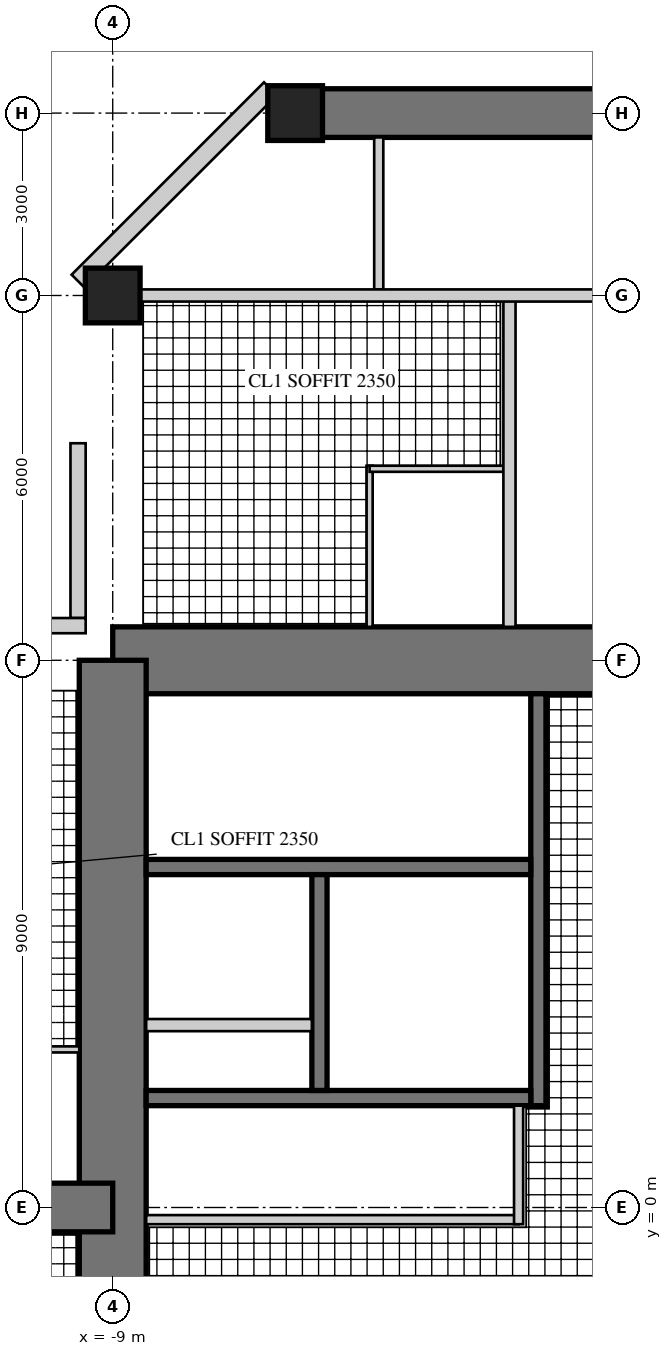
"""IFC4 building model, lengths in metres.
Left out: names, types, materials, properties, quantities, classifications, styles, units other than length and angle.
Written with IfcOpenShell. Run it as: python <this file> out.ifc"""

import sys

from ifc_helpers import new_model, si_unit, direction, frame, frame_2d, origin, origin_2d, place, context, subcontext, project, spatial, rectangle, hollow_rectangle, extrude, element, fill, save


model = new_model("IFC4")
c1 = context("Model", 3, precision=1e-05, world=origin(), true_north=direction((0.0, 1.0)))
c2 = subcontext(c1, "Body", "Model", "MODEL_VIEW")
j1 = project(units=[si_unit("LENGTHUNIT", "METRE"), si_unit("PLANEANGLEUNIT", "RADIAN")], contexts=[c1])
p1 = place(None, origin())
s1 = spatial("IfcSite", under=j1, at=p1, CompositionType="ELEMENT")
p2 = place(p1, origin())
s2 = spatial("IfcBuilding", under=s1, at=p2, CompositionType="ELEMENT")
p3 = place(p2, frame((0.0, 0.0, 200.1)))
s3 = spatial("IfcBuildingStorey", under=s2, at=p3, CompositionType="ELEMENT", Elevation=200.1)
p4 = place(p3, frame((9.0, 9.0, 0.0), z_axis=(0.0, 0.0, 1.0), x_axis=(-1.0, 0.0, 0.0)))
e1 = element("IfcWall", 1, at=p4, inside=s3, PredefinedType="SHEAR", context=c2, shape_type="SweptSolid", body=[
    extrude(rectangle(XDim=18.0, YDim=1.1, at=frame_2d((9.0, 0.0))), origin(), (0.0, 0.0, 1.0), 3.4),
])
p5 = place(p4, frame((9.8, 0.0, 0.0)))
e2 = element("IfcOpeningElement", 2, at=p5, cuts=e1, PredefinedType="OPENING", context=c2, shape_type="SweptSolid", body=[
    extrude(rectangle(XDim=1.0, YDim=2.4, at=frame_2d((0.5, 1.2))), frame((0.0, 0.56, 0.0), z_axis=(0.0, -1.0, 0.0), x_axis=(1.0, 0.0, 0.0)), (0.0, 0.0, 1.0), 1.12),
])
p6 = place(p3, frame((-9.0, 9.0, 0.0), z_axis=(0.0, 0.0, 1.0), x_axis=(0.0, -1.0, 0.0)))
e3 = element("IfcWall", 3, at=p6, inside=s3, PredefinedType="SHEAR", context=c2, shape_type="SweptSolid", body=[
    extrude(rectangle(XDim=18.0, YDim=1.1, at=frame_2d((9.0, 0.0))), origin(), (0.0, 0.0, 1.0), 3.4),
])
p7 = place(p6, frame((9.8, 0.0, 0.0)))
e4 = element("IfcOpeningElement", 4, at=p7, cuts=e3, PredefinedType="OPENING", context=c2, shape_type="SweptSolid", body=[
    extrude(rectangle(XDim=1.0, YDim=2.4, at=frame_2d((0.5, 1.2))), frame((0.0, 0.56, 0.0), z_axis=(0.0, -1.0, 0.0), x_axis=(1.0, 0.0, 0.0)), (0.0, 0.0, 1.0), 1.12),
])
p8 = place(p3, frame((-2.0, 1.675, 0.0), z_axis=(0.0, 0.0, 1.0), x_axis=(0.0, 1.0, 0.0)))
e5 = element("IfcWall", 5, at=p8, inside=s3, PredefinedType="SHEAR", context=c2, shape_type="SweptSolid", body=[
    extrude(rectangle(XDim=6.775, YDim=0.25, at=frame_2d((3.387, 0.0))), origin(), (0.0, 0.0, 1.0), 3.4),
])
p9 = place(p8, frame((0.725, 0.0, 0.0)))
e6 = element("IfcOpeningElement", 6, at=p9, cuts=e5, PredefinedType="OPENING", context=c2, shape_type="SweptSolid", body=[
    extrude(rectangle(XDim=1.0, YDim=2.1, at=frame_2d((0.5, 1.05))), frame((0.0, 0.135, 0.0), z_axis=(0.0, -1.0, 0.0), x_axis=(1.0, 0.0, 0.0)), (0.0, 0.0, 1.0), 0.27),
])
p10 = place(p3, frame((-2.125, 1.8, 0.0), z_axis=(0.0, 0.0, 1.0), x_axis=(-1.0, 0.0, 0.0)))
e7 = element("IfcWall", 7, at=p10, inside=s3, PredefinedType="SHEAR", context=c2, shape_type="SweptSolid", body=[
    extrude(rectangle(XDim=6.325, YDim=0.25, at=frame_2d((3.163, 0.0))), origin(), (0.0, 0.0, 1.0), 3.4),
])
p11 = place(p3, frame((-2.125, 5.6, 0.0), z_axis=(0.0, 0.0, 1.0), x_axis=(-1.0, 0.0, 0.0)))
e8 = element("IfcWall", 8, at=p11, inside=s3, PredefinedType="SHEAR", context=c2, shape_type="SweptSolid", body=[
    extrude(rectangle(XDim=6.325, YDim=0.25, at=frame_2d((3.163, 0.0))), origin(), (0.0, 0.0, 1.0), 3.4),
])
p12 = place(p11, frame((0.175, 0.0, 0.0)))
e9 = element("IfcOpeningElement", 9, at=p12, cuts=e8, PredefinedType="OPENING", context=c2, shape_type="SweptSolid", body=[
    extrude(rectangle(XDim=1.0, YDim=2.1, at=frame_2d((0.5, 1.05))), frame((0.0, 0.135, 0.0), z_axis=(0.0, -1.0, 0.0), x_axis=(1.0, 0.0, 0.0)), (0.0, 0.0, 1.0), 0.27),
])
p13 = place(p3, frame((-5.6, 1.925, 0.0), z_axis=(0.0, 0.0, 1.0), x_axis=(0.0, 1.0, 0.0)))
e10 = element("IfcWall", 10, at=p13, inside=s3, PredefinedType="SHEAR", context=c2, shape_type="SweptSolid", body=[
    extrude(rectangle(XDim=3.55, YDim=0.25, at=frame_2d((1.775, 0.0))), origin(), (0.0, 0.0, 1.0), 3.4),
])
p14 = place(p13, frame((1.525, 0.0, 0.0)))
e11 = element("IfcOpeningElement", 11, at=p14, cuts=e10, PredefinedType="OPENING", context=c2, shape_type="SweptSolid", body=[
    extrude(rectangle(XDim=1.1, YDim=2.2, at=frame_2d((0.55, 1.1))), frame((0.0, 0.135, 0.0), z_axis=(0.0, -1.0, 0.0), x_axis=(1.0, 0.0, 0.0)), (0.0, 0.0, 1.0), 0.27),
])
p15 = place(p13, frame((0.075, 0.0, 0.0)))
e12 = element("IfcOpeningElement", 12, at=p15, cuts=e10, PredefinedType="OPENING", context=c2, shape_type="SweptSolid", body=[
    extrude(rectangle(XDim=0.8, YDim=2.1, at=frame_2d((0.4, 1.05))), frame((0.0, 0.135, 0.0), z_axis=(0.0, -1.0, 0.0), x_axis=(1.0, 0.0, 0.0)), (0.0, 0.0, 1.0), 0.27),
])
p16 = place(p3, frame((-5.725, 3.0, 0.0), z_axis=(0.0, 0.0, 1.0), x_axis=(-1.0, 0.0, 0.0)))
e13 = element("IfcWall", 13, at=p16, inside=s3, PredefinedType="PARTITIONING", context=c2, shape_type="SweptSolid", body=[
    extrude(rectangle(XDim=2.725, YDim=0.2, at=frame_2d((1.362, 0.0))), origin(), (0.0, 0.0, 1.0), 3.4),
])
p17 = place(p3, frame((6.0, 18.0, 0.0), z_axis=(0.0, 0.0, 1.0), x_axis=(-1.0, 0.0, 0.0)))
e14 = element("IfcWall", 14, at=p17, inside=s3, PredefinedType="SHEAR", context=c2, shape_type="SweptSolid", body=[
    extrude(rectangle(XDim=12.0, YDim=0.8, at=frame_2d((6.0, 0.0))), origin(), (0.0, 0.0, 1.0), 3.4),
])
p18 = place(p17, frame((1.625, 0.0, 0.6)))
e15 = element("IfcOpeningElement", 15, at=p18, cuts=e14, PredefinedType="OPENING", context=c2, shape_type="SweptSolid", body=[
    extrude(rectangle(XDim=3.0, YDim=2.4, at=frame_2d((1.5, 1.2))), frame((0.0, 0.41, 0.0), z_axis=(0.0, -1.0, 0.0), x_axis=(1.0, 0.0, 0.0)), (0.0, 0.0, 1.0), 0.82),
])
p19 = place(p17, frame((7.375, 0.0, 0.6)))
e16 = element("IfcOpeningElement", 16, at=p19, cuts=e14, PredefinedType="OPENING", context=c2, shape_type="SweptSolid", body=[
    extrude(rectangle(XDim=3.0, YDim=2.4, at=frame_2d((1.5, 1.2))), frame((0.0, 0.41, 0.0), z_axis=(0.0, -1.0, 0.0), x_axis=(1.0, 0.0, 0.0)), (0.0, 0.0, 1.0), 0.82),
])
p20 = place(p3, frame((-9.0, 0.0, 0.0), z_axis=(0.0, 0.0, 1.0), x_axis=(-1.0, 0.0, 0.0)))
e17 = element("IfcWall", 17, at=p20, inside=s3, PredefinedType="SHEAR", context=c2, shape_type="SweptSolid", body=[
    extrude(rectangle(XDim=18.0, YDim=0.8, at=frame_2d((9.0, 0.0))), origin(), (0.0, 0.0, 1.0), 3.4),
])
p21 = place(p20, frame((3.95, 0.0, 0.0)))
e18 = element("IfcOpeningElement", 18, at=p21, cuts=e17, PredefinedType="OPENING", context=c2, shape_type="SweptSolid", body=[
    extrude(rectangle(XDim=1.0, YDim=2.15, at=frame_2d((0.5, 1.075))), frame((0.0, 0.41, 0.0), z_axis=(0.0, -1.0, 0.0), x_axis=(1.0, 0.0, 0.0)), (0.0, 0.0, 1.0), 0.82),
])
p22 = place(p20, frame((6.6, 0.0, 0.0)))
e19 = element("IfcOpeningElement", 19, at=p22, cuts=e17, PredefinedType="OPENING", context=c2, shape_type="SweptSolid", body=[
    extrude(rectangle(XDim=1.0, YDim=2.15, at=frame_2d((0.5, 1.075))), frame((0.0, 0.41, 0.0), z_axis=(0.0, -1.0, 0.0), x_axis=(1.0, 0.0, 0.0)), (0.0, 0.0, 1.0), 0.82),
])
p23 = place(p20, frame((13.25, 0.0, 0.0)))
e20 = element("IfcOpeningElement", 20, at=p23, cuts=e17, PredefinedType="OPENING", context=c2, shape_type="SweptSolid", body=[
    extrude(rectangle(XDim=1.0, YDim=2.2, at=frame_2d((0.5, 1.1))), frame((0.0, 0.41, 0.0), z_axis=(0.0, -1.0, 0.0), x_axis=(1.0, 0.0, 0.0)), (0.0, 0.0, 1.0), 0.82),
])
for number, where, z_axis, x_axis in (
    (21, (-9.0, 15.0, 0.0), (0.0, 0.0, 1.0), (1.0, 0.0, 0.0)),
    (22, (-6.0, 18.0, 0.0), (0.0, 0.0, 1.0), (1.0, 0.0, 0.0)),
):
    element("IfcColumn", number, at=place(p3, frame(where, z_axis=z_axis, x_axis=x_axis)), inside=s3, PredefinedType="COLUMN", context=c2, shape_type="SweptSolid", body=[
        extrude(rectangle(XDim=0.9, YDim=0.9, at=origin_2d()), origin(), (0.0, 0.0, 1.0), 3.4),
    ])
p24 = place(p3, frame((-6.406, 18.4, 0.0), z_axis=(0.0, 0.0, 1.0), x_axis=(-0.707134062067, -0.707079499254, 0.0)))
e23 = element("IfcWall", 23, at=p24, inside=s3, PredefinedType="SOLIDWALL", context=c2, shape_type="SweptSolid", body=[
    extrude(rectangle(XDim=4.475, YDim=0.3, at=frame_2d((2.237, 0.0))), origin(), (0.0, 0.0, 1.0), 3.22),
])
p25 = place(p24, frame((1.787, 0.0, 0.3)))
e24 = element("IfcOpeningElement", 24, at=p25, cuts=e23, PredefinedType="OPENING", context=c2, shape_type="SweptSolid", body=[
    extrude(rectangle(XDim=0.9, YDim=2.4, at=frame_2d((0.45, 1.2))), frame((0.0, 0.16, 0.0), z_axis=(0.0, -1.0, 0.0), x_axis=(1.0, 0.0, 0.0)), (0.0, 0.0, 1.0), 0.32),
])
p26 = place(p3, frame((-9.57, 12.57, 0.0), z_axis=(0.0, 0.0, 1.0), x_axis=(0.0, -1.0, 0.0)))
e25 = element("IfcWall", 25, at=p26, inside=s3, PredefinedType="SOLIDWALL", context=c2, shape_type="SweptSolid", body=[
    extrude(rectangle(XDim=2.875, YDim=0.25, at=frame_2d((1.438, 0.0))), origin(), (0.0, 0.0, 1.0), 3.22),
])
p27 = place(p26, frame((0.6, 0.0, 0.0)))
e26 = element("IfcOpeningElement", 26, at=p27, cuts=e25, PredefinedType="OPENING", context=c2, shape_type="SweptSolid", body=[
    extrude(rectangle(XDim=1.0, YDim=2.2, at=frame_2d((0.5, 1.1))), frame((0.0, 0.135, 0.0), z_axis=(0.0, -1.0, 0.0), x_axis=(1.0, 0.0, 0.0)), (0.0, 0.0, 1.0), 0.27),
])
p28 = place(p3, frame((-9.445, 9.57, 0.0), z_axis=(0.0, 0.0, 1.0), x_axis=(-1.0, 0.0, 0.0)))
e27 = element("IfcWall", 27, at=p28, inside=s3, PredefinedType="SOLIDWALL", context=c2, shape_type="SweptSolid", body=[
    extrude(rectangle(XDim=3.125, YDim=0.25, at=frame_2d((1.562, 0.0))), origin(), (0.0, 0.0, 1.0), 3.22),
])
p29 = place(p28, frame((0.6, 0.0, 0.0)))
e28 = element("IfcOpeningElement", 28, at=p29, cuts=e27, PredefinedType="OPENING", context=c2, shape_type="SweptSolid", body=[
    extrude(rectangle(XDim=1.0, YDim=2.2, at=frame_2d((0.5, 1.1))), frame((0.0, 0.135, 0.0), z_axis=(0.0, -1.0, 0.0), x_axis=(1.0, 0.0, 0.0)), (0.0, 0.0, 1.0), 0.27),
])
p30 = place(p3, frame((-2.325, -0.2, 0.0), z_axis=(0.0, 0.0, 1.0), x_axis=(-1.0, 0.0, 0.0)))
e29 = element("IfcWall", 29, at=p30, inside=s3, PredefinedType="PARTITIONING", context=c2, shape_type="SweptSolid", body=[
    extrude(rectangle(XDim=6.125, YDim=0.15, at=frame_2d((3.062, 0.0))), origin(), (0.0, 0.0, 1.0), 3.22),
])
p31 = place(p30, frame((0.4, 0.0, 0.0)))
e30 = element("IfcOpeningElement", 30, at=p31, cuts=e29, PredefinedType="OPENING", context=c2, shape_type="SweptSolid", body=[
    extrude(rectangle(XDim=1.0, YDim=2.1, at=frame_2d((0.5, 1.05))), frame((0.0, 0.085, 0.0), z_axis=(0.0, -1.0, 0.0), x_axis=(1.0, 0.0, 0.0)), (0.0, 0.0, 1.0), 0.17),
])
p32 = place(p3, frame((-2.325, 1.675, 0.0), z_axis=(0.0, 0.0, 1.0), x_axis=(0.0, -1.0, 0.0)))
e31 = element("IfcWall", 31, at=p32, inside=s3, PredefinedType="PARTITIONING", context=c2, shape_type="SweptSolid", body=[
    extrude(rectangle(XDim=1.95, YDim=0.15, at=frame_2d((0.975, 0.0))), origin(), (0.0, 0.0, 1.0), 3.22),
])
p33 = place(p3, frame((-4.775, 9.55, 0.0), z_axis=(0.0, 0.0, 1.0), x_axis=(0.0, 1.0, 0.0)))
e32 = element("IfcWall", 32, at=p33, inside=s3, PredefinedType="PARTITIONING", context=c2, shape_type="SweptSolid", body=[
    extrude(rectangle(XDim=2.65, YDim=0.1, at=frame_2d((1.325, 0.0))), origin(), (0.0, 0.0, 1.0), 3.22),
])
p34 = place(p3, frame((-2.575, 12.15, 0.0), z_axis=(0.0, 0.0, 1.0), x_axis=(-1.0, 0.0, 0.0)))
e33 = element("IfcWall", 33, at=p34, inside=s3, PredefinedType="PARTITIONING", context=c2, shape_type="SweptSolid", body=[
    extrude(rectangle(XDim=2.2, YDim=0.1, at=frame_2d((1.1, 0.0))), origin(), (0.0, 0.0, 1.0), 3.22),
])
p35 = place(p34, frame((0.55, 0.0, 0.0)))
e34 = element("IfcOpeningElement", 34, at=p35, cuts=e33, PredefinedType="OPENING", context=c2, shape_type="SweptSolid", body=[
    extrude(rectangle(XDim=0.9, YDim=2.1, at=frame_2d((0.45, 1.05))), frame((0.0, 0.06, 0.0), z_axis=(0.0, -1.0, 0.0), x_axis=(1.0, 0.0, 0.0)), (0.0, 0.0, 1.0), 0.12),
])
p36 = place(p3, frame((-2.475, 9.55, 0.0), z_axis=(0.0, 0.0, 1.0), x_axis=(0.0, 1.0, 0.0)))
e35 = element("IfcWall", 35, at=p36, inside=s3, PredefinedType="SOLIDWALL", context=c2, shape_type="SweptSolid", body=[
    extrude(rectangle(XDim=5.45, YDim=0.2, at=frame_2d((2.725, 0.0))), origin(), (0.0, 0.0, 1.0), 3.22),
])
p37 = place(p36, frame((3.4, 0.0, 0.0)))
e36 = element("IfcOpeningElement", 36, at=p37, cuts=e35, PredefinedType="OPENING", context=c2, shape_type="SweptSolid", body=[
    extrude(rectangle(XDim=1.0, YDim=2.15, at=frame_2d((0.5, 1.075))), frame((0.0, 0.11, 0.0), z_axis=(0.0, -1.0, 0.0), x_axis=(1.0, 0.0, 0.0)), (0.0, 0.0, 1.0), 0.22),
])
p38 = place(p3, frame((-4.625, 15.1, 0.0), z_axis=(0.0, 0.0, 1.0), x_axis=(0.0, 1.0, 0.0)))
e37 = element("IfcWall", 37, at=p38, inside=s3, PredefinedType="PARTITIONING", context=c2, shape_type="SweptSolid", body=[
    extrude(rectangle(XDim=2.5, YDim=0.15, at=frame_2d((1.25, 0.0))), origin(), (0.0, 0.0, 1.0), 3.22),
])
p39 = place(p38, frame((0.6, 0.0, 0.0)))
e38 = element("IfcOpeningElement", 38, at=p39, cuts=e37, PredefinedType="OPENING", context=c2, shape_type="SweptSolid", body=[
    extrude(rectangle(XDim=1.0, YDim=2.1, at=frame_2d((0.5, 1.05))), frame((0.0, 0.085, 0.0), z_axis=(0.0, -1.0, 0.0), x_axis=(1.0, 0.0, 0.0)), (0.0, 0.0, 1.0), 0.17),
])
p40 = place(p3, frame((-0.4, 15.0, 0.0), z_axis=(0.0, 0.0, 1.0), x_axis=(-1.0, 0.0, 0.0)))
e39 = element("IfcWall", 39, at=p40, inside=s3, PredefinedType="SOLIDWALL", context=c2, shape_type="SweptSolid", body=[
    extrude(rectangle(XDim=8.15, YDim=0.2, at=frame_2d((4.075, 0.0))), origin(), (0.0, 0.0, 1.0), 2.47),
])
p41 = place(p40, frame((0.4, 0.0, 0.0)))
e40 = element("IfcOpeningElement", 40, at=p41, cuts=e39, PredefinedType="OPENING", context=c2, shape_type="SweptSolid", body=[
    extrude(rectangle(XDim=1.0, YDim=2.2, at=frame_2d((0.5, 1.1))), frame((0.0, 0.11, 0.0), z_axis=(0.0, -1.0, 0.0), x_axis=(1.0, 0.0, 0.0)), (0.0, 0.0, 1.0), 0.22),
])
p42 = place(p3, frame((-9.55, 2.6, 0.0), z_axis=(0.0, 0.0, 1.0), x_axis=(-1.0, 0.0, 0.0)))
e41 = element("IfcWall", 41, at=p42, inside=s3, PredefinedType="PARTITIONING", context=c2, shape_type="SweptSolid", body=[
    extrude(rectangle(XDim=2.65, YDim=0.1, at=frame_2d((1.325, 0.0))), origin(), (0.0, 0.0, 1.0), 3.22),
])
p43 = place(p19, origin())
e42 = element("IfcWindow", 42, at=p43, inside=s3, PartitioningType="SINGLE_PANEL", PredefinedType="WINDOW", context=c2, shape_type="SweptSolid", body=[
    extrude(hollow_rectangle(XDim=3.0, YDim=2.4, WallThickness=0.06, at=frame_2d((1.5, 1.2))), frame((0.0, 0.03, 0.0), z_axis=(0.0, -1.0, 0.0), x_axis=(1.0, 0.0, 0.0)), (0.0, 0.0, 1.0), 0.06),
    extrude(rectangle(XDim=2.879, YDim=2.279, at=frame_2d((1.5, 1.2))), frame((0.0, 0.03, 0.0), z_axis=(0.0, -1.0, 0.0), x_axis=(1.0, 0.0, 0.0)), (0.0, 0.0, 1.0), 0.06),
])
fill(e16, e42)
p44 = place(p25, origin())
e43 = element("IfcWindow", 43, at=p44, inside=s3, PartitioningType="SINGLE_PANEL", PredefinedType="WINDOW", context=c2, shape_type="SweptSolid", body=[
    extrude(hollow_rectangle(XDim=0.9, YDim=2.4, WallThickness=0.06, at=frame_2d((0.45, 1.2))), frame((0.0, 0.03, 0.0), z_axis=(0.0, -1.0, 0.0), x_axis=(1.0, 0.0, 0.0)), (0.0, 0.0, 1.0), 0.06),
    extrude(rectangle(XDim=0.779, YDim=2.279, at=frame_2d((0.45, 1.2))), frame((0.0, 0.03, 0.0), z_axis=(0.0, -1.0, 0.0), x_axis=(1.0, 0.0, 0.0)), (0.0, 0.0, 1.0), 0.06),
])
fill(e24, e43)
p45 = place(p27, origin())
e44 = element("IfcDoor", 44, at=p45, inside=s3, OperationType="SINGLE_SWING_RIGHT", PredefinedType="DOOR", context=c2, shape_type="SweptSolid", body=[
    extrude(hollow_rectangle(XDim=1.0, YDim=2.2, WallThickness=0.06, at=frame_2d((0.5, 1.1))), frame((0.0, 0.025, 0.0), z_axis=(0.0, -1.0, 0.0), x_axis=(1.0, 0.0, 0.0)), (0.0, 0.0, 1.0), 0.05),
    extrude(rectangle(XDim=0.879, YDim=2.079, at=frame_2d((0.5, 1.1))), frame((0.0, 0.025, 0.0), z_axis=(0.0, -1.0, 0.0), x_axis=(1.0, 0.0, 0.0)), (0.0, 0.0, 1.0), 0.05),
])
fill(e26, e44)
p46 = place(p31, frame((1.0, 0.0, 0.0), z_axis=(0.0, 0.0, 1.0), x_axis=(-1.0, 0.0, 0.0)))
e45 = element("IfcDoor", 45, at=p46, inside=s3, OperationType="SINGLE_SWING_RIGHT", PredefinedType="DOOR", context=c2, shape_type="SweptSolid", body=[
    extrude(rectangle(XDim=1.0, YDim=2.1, at=frame_2d((0.5, 1.05))), frame((0.0, 0.025, 0.0), z_axis=(0.0, -1.0, 0.0), x_axis=(1.0, 0.0, 0.0)), (0.0, 0.0, 1.0), 0.05),
])
fill(e30, e45)
p47 = place(p35, origin())
e46 = element("IfcDoor", 46, at=p47, inside=s3, OperationType="SINGLE_SWING_LEFT", PredefinedType="DOOR", context=c2, shape_type="SweptSolid", body=[
    extrude(rectangle(XDim=0.9, YDim=2.1, at=frame_2d((0.45, 1.05))), frame((0.0, 0.025, 0.0), z_axis=(0.0, -1.0, 0.0), x_axis=(1.0, 0.0, 0.0)), (0.0, 0.0, 1.0), 0.05),
])
fill(e34, e46)
p48 = place(p37, origin())
e47 = element("IfcDoor", 47, at=p48, inside=s3, OperationType="SINGLE_SWING_LEFT", PredefinedType="DOOR", context=c2, shape_type="SweptSolid", body=[
    extrude(rectangle(XDim=1.0, YDim=2.15, at=frame_2d((0.5, 1.075))), frame((0.0, 0.025, 0.0), z_axis=(0.0, -1.0, 0.0), x_axis=(1.0, 0.0, 0.0)), (0.0, 0.0, 1.0), 0.05),
])
fill(e36, e47)
p49 = place(p39, origin())
e48 = element("IfcDoor", 48, at=p49, inside=s3, OperationType="SINGLE_SWING_LEFT", PredefinedType="DOOR", context=c2, shape_type="SweptSolid", body=[
    extrude(rectangle(XDim=1.0, YDim=2.1, at=frame_2d((0.5, 1.05))), frame((0.0, 0.025, 0.0), z_axis=(0.0, -1.0, 0.0), x_axis=(1.0, 0.0, 0.0)), (0.0, 0.0, 1.0), 0.05),
])
fill(e38, e48)
p50 = place(p41, frame((1.0, 0.0, 0.0), z_axis=(0.0, 0.0, 1.0), x_axis=(-1.0, 0.0, 0.0)))
e49 = element("IfcDoor", 49, at=p50, inside=s3, OperationType="SINGLE_SWING_RIGHT", PredefinedType="DOOR", context=c2, shape_type="SweptSolid", body=[
    extrude(rectangle(XDim=1.0, YDim=2.2, at=frame_2d((0.5, 1.1))), frame((0.0, 0.025, 0.0), z_axis=(0.0, -1.0, 0.0), x_axis=(1.0, 0.0, 0.0)), (0.0, 0.0, 1.0), 0.05),
])
fill(e40, e49)
p51 = place(p5, origin())
e50 = element("IfcDoor", 50, at=p51, inside=s3, OperationType="SINGLE_SWING_RIGHT", PredefinedType="DOOR", context=c2, shape_type="SweptSolid", body=[
    extrude(rectangle(XDim=1.0, YDim=2.4, at=frame_2d((0.5, 1.2))), frame((0.0, 0.055, 0.0), z_axis=(0.0, -1.0, 0.0), x_axis=(1.0, 0.0, 0.0)), (0.0, 0.0, 1.0), 0.05),
])
fill(e2, e50)
p52 = place(p7, origin())
e51 = element("IfcDoor", 51, at=p52, inside=s3, OperationType="SINGLE_SWING_RIGHT", PredefinedType="DOOR", context=c2, shape_type="SweptSolid", body=[
    extrude(rectangle(XDim=1.0, YDim=2.4, at=frame_2d((0.5, 1.2))), frame((0.0, 0.055, 0.0), z_axis=(0.0, -1.0, 0.0), x_axis=(1.0, 0.0, 0.0)), (0.0, 0.0, 1.0), 0.05),
])
fill(e4, e51)
p53 = place(p9, origin())
e52 = element("IfcDoor", 52, at=p53, inside=s3, OperationType="SINGLE_SWING_LEFT", PredefinedType="DOOR", context=c2, shape_type="SweptSolid", body=[
    extrude(rectangle(XDim=1.0, YDim=2.1, at=frame_2d((0.5, 1.05))), frame((0.0, 0.025, 0.0), z_axis=(0.0, -1.0, 0.0), x_axis=(1.0, 0.0, 0.0)), (0.0, 0.0, 1.0), 0.05),
])
fill(e6, e52)
p54 = place(p12, frame((1.0, 0.0, 0.0), z_axis=(0.0, 0.0, 1.0), x_axis=(-1.0, 0.0, 0.0)))
e53 = element("IfcDoor", 53, at=p54, inside=s3, OperationType="SINGLE_SWING_RIGHT", PredefinedType="DOOR", context=c2, shape_type="SweptSolid", body=[
    extrude(rectangle(XDim=1.0, YDim=2.1, at=frame_2d((0.5, 1.05))), frame((0.0, 0.025, 0.0), z_axis=(0.0, -1.0, 0.0), x_axis=(1.0, 0.0, 0.0)), (0.0, 0.0, 1.0), 0.05),
])
fill(e9, e53)
p55 = place(p14, origin())
e54 = element("IfcDoor", 54, at=p55, inside=s3, OperationType="DOUBLE_DOOR_SLIDING", PredefinedType="DOOR", context=c2, shape_type="SweptSolid", body=[
    extrude(rectangle(XDim=1.1, YDim=2.2, at=frame_2d((0.55, 1.1))), frame((0.0, 0.025, 0.0), z_axis=(0.0, -1.0, 0.0), x_axis=(1.0, 0.0, 0.0)), (0.0, 0.0, 1.0), 0.05),
])
fill(e11, e54)
p56 = place(p15, origin())
e55 = element("IfcDoor", 55, at=p56, inside=s3, OperationType="SINGLE_SWING_LEFT", PredefinedType="DOOR", context=c2, shape_type="SweptSolid", body=[
    extrude(rectangle(XDim=0.8, YDim=2.1, at=frame_2d((0.4, 1.05))), frame((0.0, 0.025, 0.0), z_axis=(0.0, -1.0, 0.0), x_axis=(1.0, 0.0, 0.0)), (0.0, 0.0, 1.0), 0.05),
])
fill(e12, e55)
save(model, sys.argv[1])
